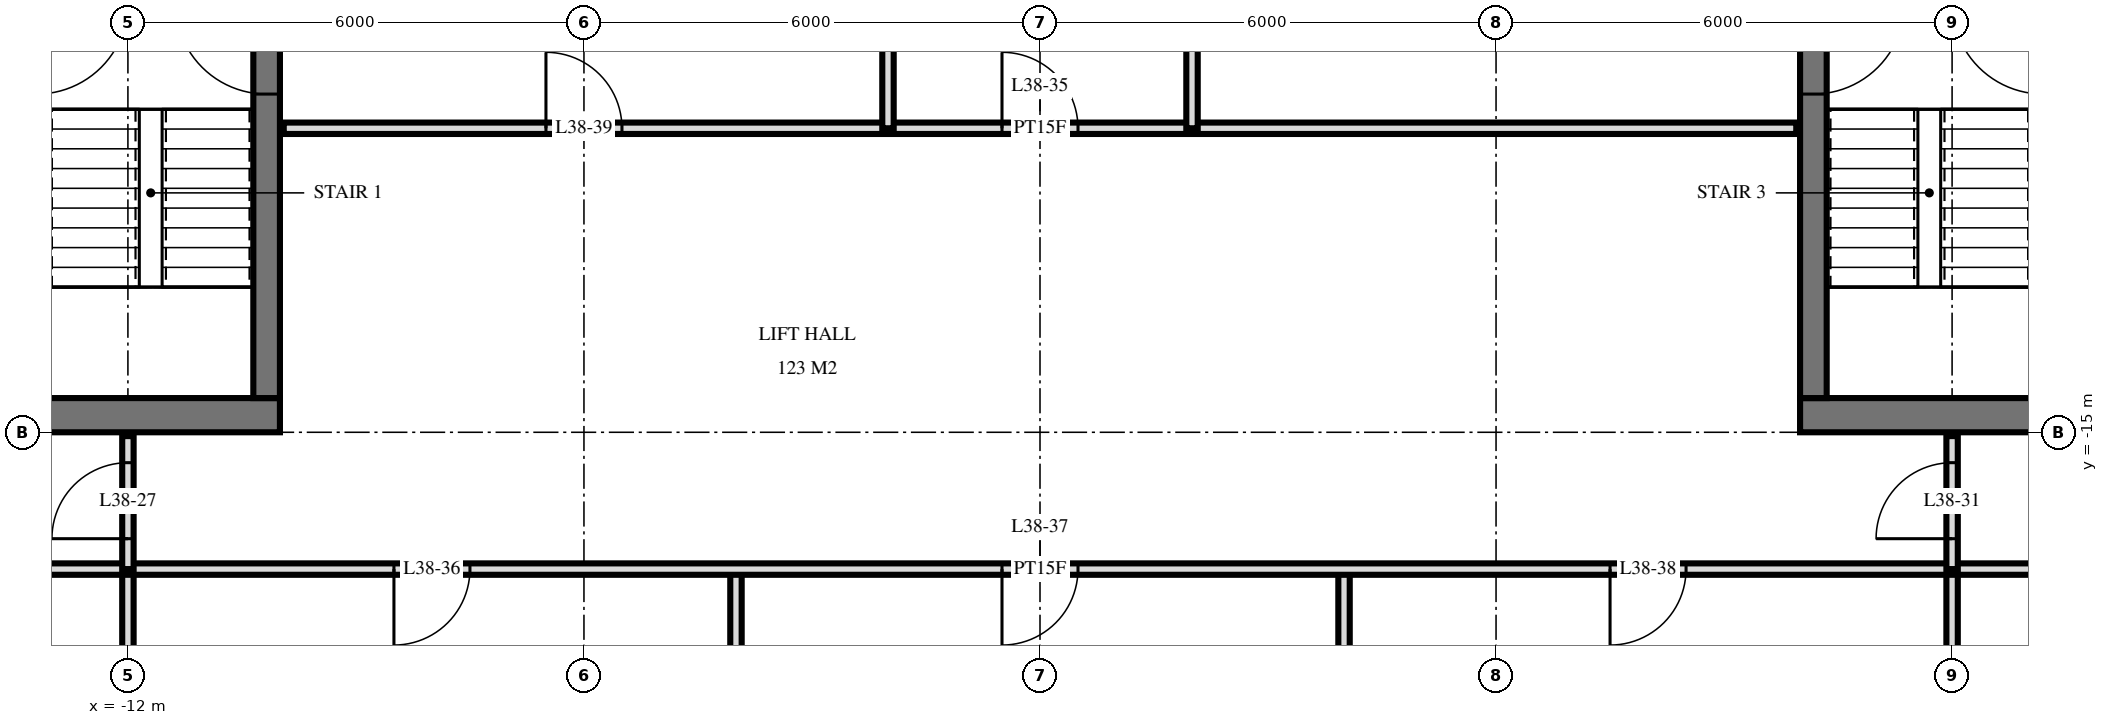
"""IFC4 building model, lengths in metres.
Left out: names, types, materials, properties, quantities, classifications, styles, units other than length and angle.
Written with IfcOpenShell. Run it as: python <this file> out.ifc"""

import sys

from ifc_helpers import new_model, si_unit, direction, frame, frame_2d, origin, place, context, subcontext, project, spatial, rectangle, extrude, element, fill, save


model = new_model("IFC4")
c1 = context("Model", 3, precision=1e-05, world=origin(), true_north=direction((0.0, 1.0)))
c2 = subcontext(c1, "Body", "Model", "MODEL_VIEW")
j1 = project(units=[si_unit("LENGTHUNIT", "METRE"), si_unit("PLANEANGLEUNIT", "RADIAN")], contexts=[c1])
p1 = place(None, origin())
s1 = spatial("IfcSite", under=j1, at=p1, CompositionType="ELEMENT")
p2 = place(p1, origin())
s2 = spatial("IfcBuilding", under=s1, at=p2, CompositionType="ELEMENT")
p3 = place(p2, frame((0.0, 0.0, 148.8)))
s3 = spatial("IfcBuildingStorey", under=s2, at=p3, CompositionType="ELEMENT", Elevation=148.8)
p4 = place(p3, frame((-24.5, -14.775, 0.0), z_axis=(0.0, 0.0, 1.0), x_axis=(1.0, 0.0, 0.0)))
e1 = element("IfcWall", 1, at=p4, inside=s3, PredefinedType="SHEAR", context=c2, shape_type="SweptSolid", body=[
    extrude(rectangle(XDim=14.5, YDim=0.45, at=frame_2d((7.25, 0.0))), origin(), (0.0, 0.0, 1.0), 3.6),
])
p5 = place(p4, frame((6.2, 0.0, 0.0)))
e2 = element("IfcOpeningElement", 2, at=p5, cuts=e1, PredefinedType="OPENING", context=c2, shape_type="SweptSolid", body=[
    extrude(rectangle(XDim=1.2, YDim=2.1, at=frame_2d((0.6, 1.05))), frame((0.0, 0.235, 0.0), z_axis=(0.0, -1.0, 0.0), x_axis=(1.0, 0.0, 0.0)), (0.0, 0.0, 1.0), 0.47),
])
p6 = place(p4, frame((9.25, 0.0, 0.0)))
e3 = element("IfcOpeningElement", 3, at=p6, cuts=e1, PredefinedType="OPENING", context=c2, shape_type="SweptSolid", body=[
    extrude(rectangle(XDim=1.1, YDim=2.1, at=frame_2d((0.55, 1.05))), frame((0.0, 0.235, 0.0), z_axis=(0.0, -1.0, 0.0), x_axis=(1.0, 0.0, 0.0)), (0.0, 0.0, 1.0), 0.47),
])
p7 = place(p4, frame((3.5, 0.0, 0.0)))
e4 = element("IfcOpeningElement", 4, at=p7, cuts=e1, PredefinedType="OPENING", context=c2, shape_type="SweptSolid", body=[
    extrude(rectangle(XDim=0.9, YDim=2.1, at=frame_2d((0.45, 1.05))), frame((0.0, 0.235, 0.0), z_axis=(0.0, -1.0, 0.0), x_axis=(1.0, 0.0, 0.0)), (0.0, 0.0, 1.0), 0.47),
])
p8 = place(p4, frame((1.05, 0.0, 0.0)))
e5 = element("IfcOpeningElement", 5, at=p8, cuts=e1, PredefinedType="OPENING", context=c2, shape_type="SweptSolid", body=[
    extrude(rectangle(XDim=1.0, YDim=2.1, at=frame_2d((0.5, 1.05))), frame((0.0, 0.235, 0.0), z_axis=(0.0, -1.0, 0.0), x_axis=(1.0, 0.0, 0.0)), (0.0, 0.0, 1.0), 0.47),
])
p9 = place(p3, frame((-10.175, -14.55, 0.0), z_axis=(0.0, 0.0, 1.0), x_axis=(0.0, 1.0, 0.0)))
e6 = element("IfcWall", 6, at=p9, inside=s3, PredefinedType="SHEAR", context=c2, shape_type="SweptSolid", body=[
    extrude(rectangle(XDim=14.1, YDim=0.35, at=frame_2d((7.05, 0.0))), origin(), (0.0, 0.0, 1.0), 3.6),
])
p10 = place(p9, frame((8.4, 0.0, 0.0)))
e7 = element("IfcOpeningElement", 7, at=p10, cuts=e6, PredefinedType="OPENING", context=c2, shape_type="SweptSolid", body=[
    extrude(rectangle(XDim=1.4, YDim=2.4, at=frame_2d((0.7, 1.2))), frame((0.0, 0.185, 0.0), z_axis=(0.0, -1.0, 0.0), x_axis=(1.0, 0.0, 0.0)), (0.0, 0.0, 1.0), 0.37),
])
p11 = place(p9, frame((10.0, 0.0, 0.0)))
e8 = element("IfcOpeningElement", 8, at=p11, cuts=e6, PredefinedType="OPENING", context=c2, shape_type="SweptSolid", body=[
    extrude(rectangle(XDim=1.4, YDim=2.4, at=frame_2d((0.7, 1.2))), frame((0.0, 0.185, 0.0), z_axis=(0.0, -1.0, 0.0), x_axis=(1.0, 0.0, 0.0)), (0.0, 0.0, 1.0), 0.37),
])
p12 = place(p9, frame((4.0, 0.0, 0.0)))
e9 = element("IfcOpeningElement", 9, at=p12, cuts=e6, PredefinedType="OPENING", context=c2, shape_type="SweptSolid", body=[
    extrude(rectangle(XDim=1.2, YDim=2.1, at=frame_2d((0.6, 1.05))), frame((0.0, 0.185, 0.0), z_axis=(0.0, -1.0, 0.0), x_axis=(1.0, 0.0, 0.0)), (0.0, 0.0, 1.0), 0.37),
])
p13 = place(p3, frame((10.0, -14.775, 0.0), z_axis=(0.0, 0.0, 1.0), x_axis=(1.0, 0.0, 0.0)))
e10 = element("IfcWall", 10, at=p13, inside=s3, PredefinedType="SHEAR", context=c2, shape_type="SweptSolid", body=[
    extrude(rectangle(XDim=14.5, YDim=0.45, at=frame_2d((7.25, 0.0))), origin(), (0.0, 0.0, 1.0), 3.6),
])
p14 = place(p13, frame((7.1, 0.0, 0.0)))
e11 = element("IfcOpeningElement", 11, at=p14, cuts=e10, PredefinedType="OPENING", context=c2, shape_type="SweptSolid", body=[
    extrude(rectangle(XDim=1.2, YDim=2.1, at=frame_2d((0.6, 1.05))), frame((0.0, 0.235, 0.0), z_axis=(0.0, -1.0, 0.0), x_axis=(1.0, 0.0, 0.0)), (0.0, 0.0, 1.0), 0.47),
])
p15 = place(p13, frame((4.15, 0.0, 0.0)))
e12 = element("IfcOpeningElement", 12, at=p15, cuts=e10, PredefinedType="OPENING", context=c2, shape_type="SweptSolid", body=[
    extrude(rectangle(XDim=1.1, YDim=2.1, at=frame_2d((0.55, 1.05))), frame((0.0, 0.235, 0.0), z_axis=(0.0, -1.0, 0.0), x_axis=(1.0, 0.0, 0.0)), (0.0, 0.0, 1.0), 0.47),
])
p16 = place(p13, frame((10.1, 0.0, 0.0)))
e13 = element("IfcOpeningElement", 13, at=p16, cuts=e10, PredefinedType="OPENING", context=c2, shape_type="SweptSolid", body=[
    extrude(rectangle(XDim=0.9, YDim=2.1, at=frame_2d((0.45, 1.05))), frame((0.0, 0.235, 0.0), z_axis=(0.0, -1.0, 0.0), x_axis=(1.0, 0.0, 0.0)), (0.0, 0.0, 1.0), 0.47),
])
p17 = place(p13, frame((12.45, 0.0, 0.0)))
e14 = element("IfcOpeningElement", 14, at=p17, cuts=e10, PredefinedType="OPENING", context=c2, shape_type="SweptSolid", body=[
    extrude(rectangle(XDim=1.0, YDim=2.1, at=frame_2d((0.5, 1.05))), frame((0.0, 0.235, 0.0), z_axis=(0.0, -1.0, 0.0), x_axis=(1.0, 0.0, 0.0)), (0.0, 0.0, 1.0), 0.47),
])
p18 = place(p3, frame((10.175, -14.55, 0.0), z_axis=(0.0, 0.0, 1.0), x_axis=(0.0, 1.0, 0.0)))
e15 = element("IfcWall", 15, at=p18, inside=s3, PredefinedType="SHEAR", context=c2, shape_type="SweptSolid", body=[
    extrude(rectangle(XDim=14.1, YDim=0.35, at=frame_2d((7.05, 0.0))), origin(), (0.0, 0.0, 1.0), 3.6),
])
p19 = place(p18, frame((8.4, 0.0, 0.0)))
e16 = element("IfcOpeningElement", 16, at=p19, cuts=e15, PredefinedType="OPENING", context=c2, shape_type="SweptSolid", body=[
    extrude(rectangle(XDim=1.4, YDim=2.4, at=frame_2d((0.7, 1.2))), frame((0.0, 0.185, 0.0), z_axis=(0.0, -1.0, 0.0), x_axis=(1.0, 0.0, 0.0)), (0.0, 0.0, 1.0), 0.37),
])
p20 = place(p18, frame((10.0, 0.0, 0.0)))
e17 = element("IfcOpeningElement", 17, at=p20, cuts=e15, PredefinedType="OPENING", context=c2, shape_type="SweptSolid", body=[
    extrude(rectangle(XDim=1.4, YDim=2.4, at=frame_2d((0.7, 1.2))), frame((0.0, 0.185, 0.0), z_axis=(0.0, -1.0, 0.0), x_axis=(1.0, 0.0, 0.0)), (0.0, 0.0, 1.0), 0.37),
])
p21 = place(p18, frame((4.0, 0.0, 0.0)))
e18 = element("IfcOpeningElement", 18, at=p21, cuts=e15, PredefinedType="OPENING", context=c2, shape_type="SweptSolid", body=[
    extrude(rectangle(XDim=1.2, YDim=2.1, at=frame_2d((0.6, 1.05))), frame((0.0, 0.185, 0.0), z_axis=(0.0, -1.0, 0.0), x_axis=(1.0, 0.0, 0.0)), (0.0, 0.0, 1.0), 0.37),
])
p22 = place(p3, frame((12.0, -16.8, 0.0), z_axis=(0.0, 0.0, 1.0), x_axis=(0.0, 1.0, 0.0)))
e19 = element("IfcWall", 19, at=p22, inside=s3, PredefinedType="PARTITIONING", context=c2, shape_type="SweptSolid", body=[
    extrude(rectangle(XDim=1.75, YDim=0.15, at=frame_2d((0.875, 0.0))), origin(), (0.0, 0.0, 1.0), 3.32),
])
p23 = place(p22, frame((0.4, 0.0, 0.0)))
e20 = element("IfcOpeningElement", 20, at=p23, cuts=e19, PredefinedType="OPENING", context=c2, shape_type="SweptSolid", body=[
    extrude(rectangle(XDim=1.0, YDim=2.1, at=frame_2d((0.5, 1.05))), frame((0.0, 0.085, 0.0), z_axis=(0.0, -1.0, 0.0), x_axis=(1.0, 0.0, 0.0)), (0.0, 0.0, 1.0), 0.17),
])
for number, where, z_axis, x_axis in (
    (21, (12.0, -33.62, 0.0), (0.0, 0.0, 1.0), (0.0, 1.0, 0.0)),
    (22, (4.0, -33.62, 0.0), (0.0, 0.0, 1.0), (0.0, 1.0, 0.0)),
):
    element("IfcWall", number, at=place(p3, frame(where, z_axis=z_axis, x_axis=x_axis)), inside=s3, PredefinedType="PARTITIONING", context=c2, shape_type="SweptSolid", body=[
        extrude(rectangle(XDim=16.82, YDim=0.15, at=frame_2d((8.41, 0.0))), origin(), (0.0, 0.0, 1.0), 3.32),
    ])
for number, where, z_axis, x_axis in (
    (23, (2.0, -11.0, 0.0), (0.0, 0.0, 1.0), (0.0, 1.0, 0.0)),
    (24, (-2.0, -11.0, 0.0), (0.0, 0.0, 1.0), (0.0, 1.0, 0.0)),
):
    element("IfcWall", number, at=place(p3, frame(where, z_axis=z_axis, x_axis=x_axis)), inside=s3, PredefinedType="PARTITIONING", context=c2, shape_type="SweptSolid", body=[
        extrude(rectangle(XDim=4.0, YDim=0.15, at=frame_2d((2.0, 0.0))), origin(), (0.0, 0.0, 1.0), 3.32),
    ])
p24 = place(p3, frame((-4.0, -33.62, 0.0), z_axis=(0.0, 0.0, 1.0), x_axis=(0.0, 1.0, 0.0)))
e25 = element("IfcWall", 25, at=p24, inside=s3, PredefinedType="PARTITIONING", context=c2, shape_type="SweptSolid", body=[
    extrude(rectangle(XDim=16.82, YDim=0.15, at=frame_2d((8.41, 0.0))), origin(), (0.0, 0.0, 1.0), 3.32),
])
p25 = place(p3, frame((-12.0, -16.8, 0.0), z_axis=(0.0, 0.0, 1.0), x_axis=(0.0, 1.0, 0.0)))
e26 = element("IfcWall", 26, at=p25, inside=s3, PredefinedType="PARTITIONING", context=c2, shape_type="SweptSolid", body=[
    extrude(rectangle(XDim=1.75, YDim=0.15, at=frame_2d((0.875, 0.0))), origin(), (0.0, 0.0, 1.0), 3.32),
])
p26 = place(p25, frame((0.4, 0.0, 0.0)))
e27 = element("IfcOpeningElement", 27, at=p26, cuts=e26, PredefinedType="OPENING", context=c2, shape_type="SweptSolid", body=[
    extrude(rectangle(XDim=1.0, YDim=2.1, at=frame_2d((0.5, 1.05))), frame((0.0, 0.085, 0.0), z_axis=(0.0, -1.0, 0.0), x_axis=(1.0, 0.0, 0.0)), (0.0, 0.0, 1.0), 0.17),
])
p27 = place(p3, frame((-12.0, -33.62, 0.0), z_axis=(0.0, 0.0, 1.0), x_axis=(0.0, 1.0, 0.0)))
e28 = element("IfcWall", 28, at=p27, inside=s3, PredefinedType="PARTITIONING", context=c2, shape_type="SweptSolid", body=[
    extrude(rectangle(XDim=16.82, YDim=0.15, at=frame_2d((8.41, 0.0))), origin(), (0.0, 0.0, 1.0), 3.32),
])
p28 = place(p3, frame((-28.02, -16.8, 0.0), z_axis=(0.0, 0.0, 1.0), x_axis=(1.0, 0.0, 0.0)))
e29 = element("IfcWall", 29, at=p28, inside=s3, PredefinedType="PARTITIONING", context=c2, shape_type="SweptSolid", body=[
    extrude(rectangle(XDim=56.04, YDim=0.15, at=frame_2d((28.02, 0.0))), origin(), (0.0, 0.0, 1.0), 3.32),
])
p29 = place(p28, frame((13.17, 0.0, 0.0)))
e30 = element("IfcOpeningElement", 30, at=p29, cuts=e29, PredefinedType="OPENING", context=c2, shape_type="SweptSolid", body=[
    extrude(rectangle(XDim=1.0, YDim=2.1, at=frame_2d((0.5, 1.05))), frame((0.0, 0.085, 0.0), z_axis=(0.0, -1.0, 0.0), x_axis=(1.0, 0.0, 0.0)), (0.0, 0.0, 1.0), 0.17),
])
p30 = place(p28, frame((11.32, 0.0, 0.0)))
e31 = element("IfcOpeningElement", 31, at=p30, cuts=e29, PredefinedType="OPENING", context=c2, shape_type="SweptSolid", body=[
    extrude(rectangle(XDim=1.0, YDim=2.1, at=frame_2d((0.5, 1.05))), frame((0.0, 0.085, 0.0), z_axis=(0.0, -1.0, 0.0), x_axis=(1.0, 0.0, 0.0)), (0.0, 0.0, 1.0), 0.17),
])
p31 = place(p28, frame((41.87, 0.0, 0.0)))
e32 = element("IfcOpeningElement", 32, at=p31, cuts=e29, PredefinedType="OPENING", context=c2, shape_type="SweptSolid", body=[
    extrude(rectangle(XDim=1.0, YDim=2.1, at=frame_2d((0.5, 1.05))), frame((0.0, 0.085, 0.0), z_axis=(0.0, -1.0, 0.0), x_axis=(1.0, 0.0, 0.0)), (0.0, 0.0, 1.0), 0.17),
])
p32 = place(p28, frame((43.72, 0.0, 0.0)))
e33 = element("IfcOpeningElement", 33, at=p32, cuts=e29, PredefinedType="OPENING", context=c2, shape_type="SweptSolid", body=[
    extrude(rectangle(XDim=1.0, YDim=2.1, at=frame_2d((0.5, 1.05))), frame((0.0, 0.085, 0.0), z_axis=(0.0, -1.0, 0.0), x_axis=(1.0, 0.0, 0.0)), (0.0, 0.0, 1.0), 0.17),
])
p33 = place(p28, frame((19.52, 0.0, 0.0)))
e34 = element("IfcOpeningElement", 34, at=p33, cuts=e29, PredefinedType="OPENING", context=c2, shape_type="SweptSolid", body=[
    extrude(rectangle(XDim=1.0, YDim=2.1, at=frame_2d((0.5, 1.05))), frame((0.0, 0.085, 0.0), z_axis=(0.0, -1.0, 0.0), x_axis=(1.0, 0.0, 0.0)), (0.0, 0.0, 1.0), 0.17),
])
p34 = place(p28, frame((27.52, 0.0, 0.0)))
e35 = element("IfcOpeningElement", 35, at=p34, cuts=e29, PredefinedType="OPENING", context=c2, shape_type="SweptSolid", body=[
    extrude(rectangle(XDim=1.0, YDim=2.1, at=frame_2d((0.5, 1.05))), frame((0.0, 0.085, 0.0), z_axis=(0.0, -1.0, 0.0), x_axis=(1.0, 0.0, 0.0)), (0.0, 0.0, 1.0), 0.17),
])
p35 = place(p28, frame((35.52, 0.0, 0.0)))
e36 = element("IfcOpeningElement", 36, at=p35, cuts=e29, PredefinedType="OPENING", context=c2, shape_type="SweptSolid", body=[
    extrude(rectangle(XDim=1.0, YDim=2.1, at=frame_2d((0.5, 1.05))), frame((0.0, 0.085, 0.0), z_axis=(0.0, -1.0, 0.0), x_axis=(1.0, 0.0, 0.0)), (0.0, 0.0, 1.0), 0.17),
])
p36 = place(p3, frame((-9.95, -11.0, 0.0), z_axis=(0.0, 0.0, 1.0), x_axis=(1.0, 0.0, 0.0)))
e37 = element("IfcWall", 37, at=p36, inside=s3, PredefinedType="PARTITIONING", context=c2, shape_type="SweptSolid", body=[
    extrude(rectangle(XDim=19.9, YDim=0.15, at=frame_2d((9.95, 0.0))), origin(), (0.0, 0.0, 1.0), 3.32),
])
p37 = place(p36, frame((9.45, 0.0, 0.0)))
e38 = element("IfcOpeningElement", 38, at=p37, cuts=e37, PredefinedType="OPENING", context=c2, shape_type="SweptSolid", body=[
    extrude(rectangle(XDim=1.0, YDim=2.1, at=frame_2d((0.5, 1.05))), frame((0.0, 0.085, 0.0), z_axis=(0.0, -1.0, 0.0), x_axis=(1.0, 0.0, 0.0)), (0.0, 0.0, 1.0), 0.17),
])
p38 = place(p36, frame((3.45, 0.0, 0.0)))
e39 = element("IfcOpeningElement", 39, at=p38, cuts=e37, PredefinedType="OPENING", context=c2, shape_type="SweptSolid", body=[
    extrude(rectangle(XDim=1.0, YDim=2.1, at=frame_2d((0.5, 1.05))), frame((0.0, 0.085, 0.0), z_axis=(0.0, -1.0, 0.0), x_axis=(1.0, 0.0, 0.0)), (0.0, 0.0, 1.0), 0.17),
])
p39 = place(p12, origin())
e40 = element("IfcDoor", 40, at=p39, inside=s3, OperationType="SINGLE_SWING_LEFT", PredefinedType="DOOR", context=c2, shape_type="SweptSolid", body=[
    extrude(rectangle(XDim=1.2, YDim=2.1, at=frame_2d((0.6, 1.05))), frame((0.0, 0.025, 0.0), z_axis=(0.0, -1.0, 0.0), x_axis=(1.0, 0.0, 0.0)), (0.0, 0.0, 1.0), 0.05),
])
fill(e9, e40)
p40 = place(p21, frame((0.6, 0.0, 0.0), z_axis=(0.0, 0.0, 1.0), x_axis=(-1.0, 0.0, 0.0)))
e41 = element("IfcDoor", 41, at=p40, inside=s3, OperationType="SINGLE_SWING_RIGHT", PredefinedType="DOOR", context=c2, shape_type="SweptSolid", body=[
    extrude(rectangle(XDim=1.2, YDim=2.1, at=frame_2d((0.0, 1.05))), frame((0.0, -0.025, 0.0), z_axis=(0.0, 1.0, 0.0), x_axis=(-1.0, 0.0, 0.0)), (0.0, 0.0, 1.0), 0.05),
])
fill(e18, e41)
p41 = place(p26, origin())
e42 = element("IfcDoor", 42, at=p41, inside=s3, OperationType="SINGLE_SWING_RIGHT", PredefinedType="DOOR", context=c2, shape_type="SweptSolid", body=[
    extrude(rectangle(XDim=1.0, YDim=2.1, at=frame_2d((0.5, 1.05))), frame((0.0, 0.025, 0.0), z_axis=(0.0, -1.0, 0.0), x_axis=(1.0, 0.0, 0.0)), (0.0, 0.0, 1.0), 0.05),
])
fill(e27, e42)
p42 = place(p23, origin())
e43 = element("IfcDoor", 43, at=p42, inside=s3, OperationType="SINGLE_SWING_RIGHT", PredefinedType="DOOR", context=c2, shape_type="SweptSolid", body=[
    extrude(rectangle(XDim=1.0, YDim=2.1, at=frame_2d((0.5, 1.05))), frame((0.0, 0.025, 0.0), z_axis=(0.0, -1.0, 0.0), x_axis=(1.0, 0.0, 0.0)), (0.0, 0.0, 1.0), 0.05),
])
fill(e20, e43)
p43 = place(p37, origin())
e44 = element("IfcDoor", 44, at=p43, inside=s3, OperationType="SINGLE_SWING_RIGHT", PredefinedType="DOOR", context=c2, shape_type="SweptSolid", body=[
    extrude(rectangle(XDim=1.0, YDim=2.1, at=frame_2d((0.5, 1.05))), frame((0.0, 0.025, 0.0), z_axis=(0.0, -1.0, 0.0), x_axis=(1.0, 0.0, 0.0)), (0.0, 0.0, 1.0), 0.05),
])
fill(e38, e44)
p44 = place(p33, frame((0.5, 0.0, 0.0), z_axis=(0.0, 0.0, 1.0), x_axis=(-1.0, 0.0, 0.0)))
e45 = element("IfcDoor", 45, at=p44, inside=s3, OperationType="SINGLE_SWING_LEFT", PredefinedType="DOOR", context=c2, shape_type="SweptSolid", body=[
    extrude(rectangle(XDim=1.0, YDim=2.1, at=frame_2d((0.0, 1.05))), frame((0.0, -0.025, 0.0), z_axis=(0.0, 1.0, 0.0), x_axis=(-1.0, 0.0, 0.0)), (0.0, 0.0, 1.0), 0.05),
])
fill(e34, e45)
p45 = place(p34, frame((0.5, 0.0, 0.0), z_axis=(0.0, 0.0, 1.0), x_axis=(-1.0, 0.0, 0.0)))
e46 = element("IfcDoor", 46, at=p45, inside=s3, OperationType="SINGLE_SWING_LEFT", PredefinedType="DOOR", context=c2, shape_type="SweptSolid", body=[
    extrude(rectangle(XDim=1.0, YDim=2.1, at=frame_2d((0.0, 1.05))), frame((0.0, -0.025, 0.0), z_axis=(0.0, 1.0, 0.0), x_axis=(-1.0, 0.0, 0.0)), (0.0, 0.0, 1.0), 0.05),
])
fill(e35, e46)
p46 = place(p35, frame((0.5, 0.0, 0.0), z_axis=(0.0, 0.0, 1.0), x_axis=(-1.0, 0.0, 0.0)))
e47 = element("IfcDoor", 47, at=p46, inside=s3, OperationType="SINGLE_SWING_LEFT", PredefinedType="DOOR", context=c2, shape_type="SweptSolid", body=[
    extrude(rectangle(XDim=1.0, YDim=2.1, at=frame_2d((0.0, 1.05))), frame((0.0, -0.025, 0.0), z_axis=(0.0, 1.0, 0.0), x_axis=(-1.0, 0.0, 0.0)), (0.0, 0.0, 1.0), 0.05),
])
fill(e36, e47)
p47 = place(p38, origin())
e48 = element("IfcDoor", 48, at=p47, inside=s3, OperationType="SINGLE_SWING_RIGHT", PredefinedType="DOOR", context=c2, shape_type="SweptSolid", body=[
    extrude(rectangle(XDim=1.0, YDim=2.1, at=frame_2d((0.5, 1.05))), frame((0.0, 0.025, 0.0), z_axis=(0.0, -1.0, 0.0), x_axis=(1.0, 0.0, 0.0)), (0.0, 0.0, 1.0), 0.05),
])
fill(e39, e48)
save(model, sys.argv[1])
